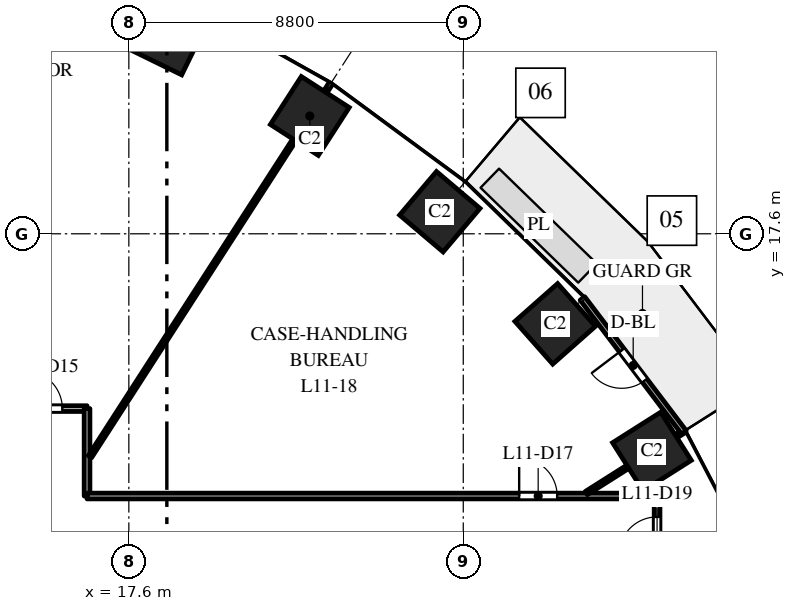
"""IFC4 building model, lengths in metres.
Left out: names, types, materials, properties, quantities, classifications, styles, units other than length and angle.
Written with IfcOpenShell. Run it as: python <this file> out.ifc"""

import sys

from ifc_helpers import new_model, si_unit, direction, frame, frame_2d, origin, origin_2d, place, context, subcontext, project, spatial, rectangle, extrude, element, fill, save


model = new_model("IFC4")
c1 = context("Model", 3, precision=1e-05, world=origin(), true_north=direction((0.0, 1.0)))
c2 = subcontext(c1, "Body", "Model", "MODEL_VIEW")
j1 = project(units=[si_unit("LENGTHUNIT", "METRE"), si_unit("PLANEANGLEUNIT", "RADIAN")], contexts=[c1])
p1 = place(None, origin())
s1 = spatial("IfcSite", under=j1, at=p1, CompositionType="ELEMENT")
p2 = place(p1, origin())
s2 = spatial("IfcBuilding", under=s1, at=p2, CompositionType="ELEMENT")
p3 = place(p2, frame((0.0, 0.0, 54.5)))
s3 = spatial("IfcBuildingStorey", under=s2, at=p3, CompositionType="ELEMENT", Elevation=54.5)
for number, where, z_axis, x_axis in (
    (1, (31.365, 11.871, 0.0), (0.0, 0.0, 1.0), (-0.535, 0.845, 0.0)),
    (2, (28.819, 15.23, 0.0), (0.0, 0.0, 1.0), (-0.663, 0.749, 0.0)),
    (3, (25.783, 18.18, 0.0), (0.0, 0.0, 1.0), (-0.763, 0.646, 0.0)),
    (4, (22.362, 20.7, 0.0), (0.0, 0.0, 1.0), (-0.84, 0.542, 0.0)),
    (5, (18.646, 22.785, 0.0), (0.0, 0.0, 1.0), (-0.898, 0.439, 0.0)),
):
    element("IfcColumn", number, at=place(p3, frame(where, z_axis=z_axis, x_axis=x_axis)), inside=s3, PredefinedType="COLUMN", context=c2, shape_type="SweptSolid", body=[
        extrude(rectangle(XDim=1.5, YDim=1.5, at=origin_2d()), origin(), (0.0, 0.0, 1.0), 4.0),
    ])
p4 = place(p3, frame((32.208, 12.374, 0.0), z_axis=(0.0, 0.0, 1.0), x_axis=(-0.604045763106, 0.796949632081, 0.0)))
e6 = element("IfcWall", 6, at=p4, inside=s3, PredefinedType="STANDARD", context=c2, shape_type="SweptSolid", body=[
    extrude(rectangle(XDim=4.423, YDim=0.15, at=frame_2d((2.212, 0.0))), origin(), (0.0, 0.0, 1.0), 3.7),
])
p5 = place(p4, frame((1.712, 0.0, 0.0)))
e7 = element("IfcOpeningElement", 7, at=p5, cuts=e6, PredefinedType="OPENING", context=c2, shape_type="SweptSolid", body=[
    extrude(rectangle(XDim=1.0, YDim=2.4, at=frame_2d((0.5, 1.2))), frame((0.0, 0.085, 0.0), z_axis=(0.0, -1.0, 0.0), x_axis=(1.0, 0.0, 0.0)), (0.0, 0.0, 1.0), 0.17),
])
p6 = place(p3, frame((7.499, 13.0, 0.0), z_axis=(0.0, 0.0, 1.0), x_axis=(1.0, 0.0, 0.0)))
e8 = element("IfcWall", 8, at=p6, inside=s3, PredefinedType="PARTITIONING", context=c2, shape_type="SweptSolid", body=[
    extrude(rectangle(XDim=9.001, YDim=0.15, at=frame_2d((4.5, 0.0))), origin(), (0.0, 0.0, 1.0), 2.85),
])
p7 = place(p6, frame((7.351, 0.0, 0.0)))
e9 = element("IfcOpeningElement", 9, at=p7, cuts=e8, PredefinedType="OPENING", context=c2, shape_type="SweptSolid", body=[
    extrude(rectangle(XDim=1.0, YDim=2.1, at=frame_2d((0.5, 1.05))), frame((0.0, 0.085, 0.0), z_axis=(0.0, -1.0, 0.0), x_axis=(1.0, 0.0, 0.0)), (0.0, 0.0, 1.0), 0.17),
])
p8 = place(p3, frame((16.5, 10.7, 0.0), z_axis=(0.0, 0.0, 1.0), x_axis=(0.0, 1.0, 0.0)))
e10 = element("IfcWall", 10, at=p8, inside=s3, PredefinedType="PARTITIONING", context=c2, shape_type="SweptSolid", body=[
    extrude(rectangle(XDim=2.3, YDim=0.15, at=frame_2d((1.15, 0.0))), origin(), (0.0, 0.0, 1.0), 3.7),
])
p9 = place(p3, frame((16.5, 10.7, 0.0), z_axis=(0.0, 0.0, 1.0), x_axis=(1.0, 0.0, 0.0)))
e11 = element("IfcWall", 11, at=p9, inside=s3, PredefinedType="PARTITIONING", context=c2, shape_type="SweptSolid", body=[
    extrude(rectangle(XDim=15.0, YDim=0.15, at=frame_2d((7.5, 0.0))), origin(), (0.0, 0.0, 1.0), 2.75),
])
p10 = place(p9, frame((11.371, 0.0, 0.0)))
e12 = element("IfcOpeningElement", 12, at=p10, cuts=e11, PredefinedType="OPENING", context=c2, shape_type="SweptSolid", body=[
    extrude(rectangle(XDim=1.0, YDim=2.1, at=frame_2d((0.5, 1.05))), frame((0.0, 0.085, 0.0), z_axis=(0.0, -1.0, 0.0), x_axis=(1.0, 0.0, 0.0)), (0.0, 0.0, 1.0), 0.17),
])
p11 = place(p3, frame((16.575, 11.733, 0.0), z_axis=(0.0, 0.0, 1.0), x_axis=(0.54222594427, 0.840232720953, 0.0)))
e13 = element("IfcWall", 13, at=p11, inside=s3, PredefinedType="PARTITIONING", context=c2, shape_type="SweptSolid", body=[
    extrude(rectangle(XDim=11.674, YDim=0.1, at=frame_2d((5.837, 0.0))), origin(), (0.0, 0.0, 1.0), 3.7),
])
p12 = place(p3, frame((29.637, 10.777, 0.0), z_axis=(0.0, 0.0, 1.0), x_axis=(0.844810627195, 0.535065420467, 0.0)))
e14 = element("IfcWall", 14, at=p12, inside=s3, PredefinedType="PARTITIONING", context=c2, shape_type="SweptSolid", body=[
    extrude(rectangle(XDim=3.048, YDim=0.1, at=frame_2d((1.524, 0.0))), origin(), (0.0, 0.0, 1.0), 2.85),
])
p13 = place(p3, frame((31.5, 8.5, 0.0), z_axis=(0.0, 0.0, 1.0), x_axis=(0.0, 1.0, 0.0)))
e15 = element("IfcWall", 15, at=p13, inside=s3, PredefinedType="PARTITIONING", context=c2, shape_type="SweptSolid", body=[
    extrude(rectangle(XDim=2.2, YDim=0.15, at=frame_2d((1.1, 0.0))), origin(), (0.0, 0.0, 1.0), 2.85),
])
p14 = place(p13, frame((0.65, 0.0, 0.0)))
e16 = element("IfcOpeningElement", 16, at=p14, cuts=e15, PredefinedType="OPENING", context=c2, shape_type="SweptSolid", body=[
    extrude(rectangle(XDim=1.0, YDim=2.1, at=frame_2d((0.5, 1.05))), frame((0.0, 0.085, 0.0), z_axis=(0.0, -1.0, 0.0), x_axis=(1.0, 0.0, 0.0)), (0.0, 0.0, 1.0), 0.17),
])
p15 = place(p5, origin())
e17 = element("IfcDoor", 17, at=p15, inside=s3, OperationType="SINGLE_SWING_RIGHT", PredefinedType="DOOR", context=c2, shape_type="SweptSolid", body=[
    extrude(rectangle(XDim=1.0, YDim=2.4, at=frame_2d((0.5, 1.2))), frame((0.0, 0.025, 0.0), z_axis=(0.0, -1.0, 0.0), x_axis=(1.0, 0.0, 0.0)), (0.0, 0.0, 1.0), 0.05),
])
fill(e7, e17)
p16 = place(p7, origin())
e18 = element("IfcDoor", 18, at=p16, inside=s3, OperationType="SINGLE_SWING_LEFT", PredefinedType="DOOR", context=c2, shape_type="SweptSolid", body=[
    extrude(rectangle(XDim=1.0, YDim=2.1, at=frame_2d((0.5, 1.05))), frame((0.0, 0.025, 0.0), z_axis=(0.0, -1.0, 0.0), x_axis=(1.0, 0.0, 0.0)), (0.0, 0.0, 1.0), 0.05),
])
fill(e9, e18)
p17 = place(p10, origin())
e19 = element("IfcDoor", 19, at=p17, inside=s3, OperationType="SINGLE_SWING_LEFT", PredefinedType="DOOR", context=c2, shape_type="SweptSolid", body=[
    extrude(rectangle(XDim=1.0, YDim=2.1, at=frame_2d((0.5, 1.05))), frame((0.0, 0.025, 0.0), z_axis=(0.0, -1.0, 0.0), x_axis=(1.0, 0.0, 0.0)), (0.0, 0.0, 1.0), 0.05),
])
fill(e12, e19)
p18 = place(p14, origin())
e20 = element("IfcDoor", 20, at=p18, inside=s3, OperationType="SINGLE_SWING_LEFT", PredefinedType="DOOR", context=c2, shape_type="SweptSolid", body=[
    extrude(rectangle(XDim=1.0, YDim=2.1, at=frame_2d((0.5, 1.05))), frame((0.0, 0.025, 0.0), z_axis=(0.0, -1.0, 0.0), x_axis=(1.0, 0.0, 0.0)), (0.0, 0.0, 1.0), 0.05),
])
fill(e16, e20)
save(model, sys.argv[1])
